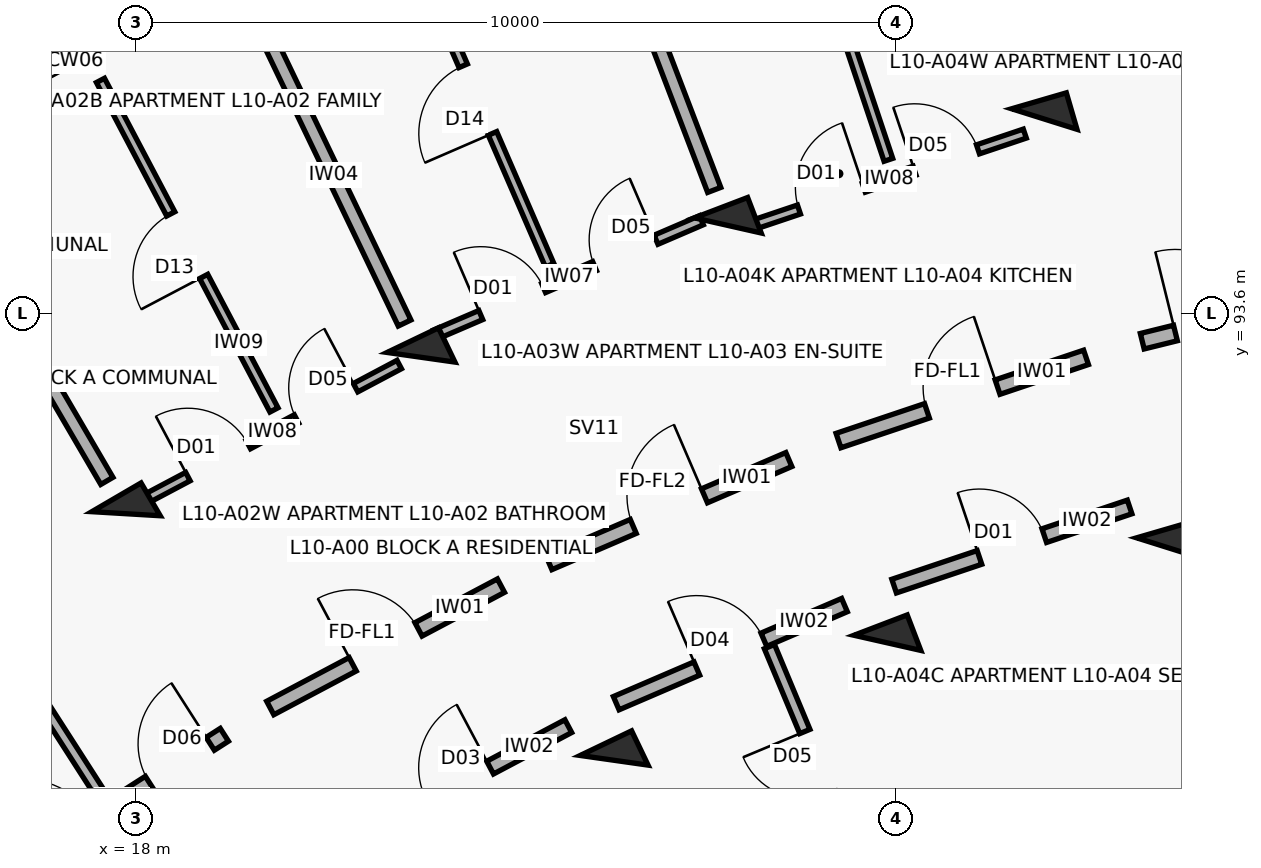
"""IFC4 building model, lengths in metres.
Left out: names, types, materials, properties, quantities, classifications, styles, units other than length and angle.
Written with IfcOpenShell. Run it as: python <this file> out.ifc"""

import sys

from ifc_helpers import new_model, si_unit, direction, frame, frame_2d, origin, origin_2d, place, context, subcontext, project, spatial, rectangle, extrude, element, fill, save


model = new_model("IFC4")
c1 = context("Model", 3, precision=1e-05, world=origin(), true_north=direction((0.0, 1.0)))
c2 = subcontext(c1, "Body", "Model", "MODEL_VIEW")
j1 = project(units=[si_unit("LENGTHUNIT", "METRE"), si_unit("PLANEANGLEUNIT", "RADIAN")], contexts=[c1])
p1 = place(None, origin())
s1 = spatial("IfcSite", under=j1, at=p1, CompositionType="ELEMENT")
p2 = place(p1, origin())
s2 = spatial("IfcBuilding", under=s1, at=p2, CompositionType="ELEMENT")
p3 = place(p2, frame((0.0, 0.0, 32.9)))
s3 = spatial("IfcBuildingStorey", under=s2, at=p3, CompositionType="ELEMENT", Elevation=32.9)
for number, where, z_axis, x_axis in (
    (1, (17.873, 90.96, 0.0), (0.0, 0.0, 1.0), (-0.504, 0.864, 0.0)),
    (2, (24.294, 87.716, 0.0), (0.0, 0.0, 1.0), (-0.432, 0.902, 0.0)),
    (3, (21.754, 93.019, 0.0), (0.0, 0.0, 1.0), (-0.432, 0.902, 0.0)),
    (4, (27.889, 89.261, 0.0), (0.0, 0.0, 1.0), (-0.357, 0.934, 0.0)),
    (5, (25.79, 94.753, 0.0), (0.0, 0.0, 1.0), (-0.357, 0.934, 0.0)),
    (6, (31.599, 90.508, 0.0), (0.0, 0.0, 1.0), (-0.28, 0.96, 0.0)),
    (7, (29.954, 96.153, 0.0), (0.0, 0.0, 1.0), (-0.28, 0.96, 0.0)),
):
    element("IfcColumn", number, at=place(p3, frame(where, z_axis=z_axis, x_axis=x_axis)), inside=s3, PredefinedType="COLUMN", context=c2, shape_type="SweptSolid", body=[
        extrude(rectangle(XDim=0.5, YDim=0.75, at=origin_2d()), origin(), (0.0, 0.0, 1.0), 3.1),
    ])
p4 = place(p3, frame((16.272, 86.199, 0.0), z_axis=(0.0, 0.0, 1.0), x_axis=(0.842257205985, 0.539075874963, 0.0)))
e8 = element("IfcWall", 8, at=p4, inside=s3, PredefinedType="SOLIDWALL", context=c2, shape_type="SweptSolid", body=[
    extrude(rectangle(XDim=3.436, YDim=0.2, at=frame_2d((1.718, 0.0))), origin(), (0.0, 0.0, 1.0), 2.08),
])
p5 = place(p4, frame((0.28, 0.0, 0.0)))
e9 = element("IfcOpeningElement", 9, at=p5, cuts=e8, PredefinedType="OPENING", context=c2, shape_type="SweptSolid", body=[
    extrude(rectangle(XDim=1.12, YDim=2.15, at=frame_2d((0.56, 1.075))), frame((0.0, 0.11, 0.0), z_axis=(0.0, -1.0, 0.0), x_axis=(1.0, 0.0, 0.0)), (0.0, 0.0, 1.0), 0.22),
])
p6 = place(p4, frame((2.266, 0.0, 0.0)))
e10 = element("IfcOpeningElement", 10, at=p6, cuts=e8, PredefinedType="OPENING", context=c2, shape_type="SweptSolid", body=[
    extrude(rectangle(XDim=0.95, YDim=2.1, at=frame_2d((0.475, 1.05))), frame((0.0, 0.11, 0.0), z_axis=(0.0, -1.0, 0.0), x_axis=(1.0, 0.0, 0.0)), (0.0, 0.0, 1.0), 0.22),
])
p7 = place(p3, frame((17.524, 87.288, 0.0), z_axis=(0.0, 0.0, 1.0), x_axis=(-0.540338452216, 0.841447774408, 0.0)))
e11 = element("IfcWall", 11, at=p7, inside=s3, PredefinedType="PARTITIONING", context=c2, shape_type="SweptSolid", body=[
    extrude(rectangle(XDim=7.95, YDim=0.14, at=frame_2d((3.975, 0.0))), origin(), (0.0, 0.0, 1.0), 2.08),
])
p8 = place(p7, frame((6.05, 0.0, 0.0)))
e12 = element("IfcOpeningElement", 12, at=p8, cuts=e11, PredefinedType="OPENING", context=c2, shape_type="SweptSolid", body=[
    extrude(rectangle(XDim=0.92, YDim=2.1, at=frame_2d((0.46, 1.05))), frame((0.0, 0.08, 0.0), z_axis=(0.0, -1.0, 0.0), x_axis=(1.0, 0.0, 0.0)), (0.0, 0.0, 1.0), 0.16),
])
p9 = place(p3, frame((19.77, 88.404, 0.0), z_axis=(0.0, 0.0, 1.0), x_axis=(0.883410853063, 0.468599258099, 0.0)))
e13 = element("IfcWall", 13, at=p9, inside=s3, PredefinedType="SOLIDWALL", context=c2, shape_type="SweptSolid", body=[
    extrude(rectangle(XDim=3.436, YDim=0.2, at=frame_2d((1.718, 0.0))), origin(), (0.0, 0.0, 1.0), 2.08),
])
p10 = place(p9, frame((1.228, 0.0, 0.0)))
e14 = element("IfcOpeningElement", 14, at=p10, cuts=e13, PredefinedType="OPENING", context=c2, shape_type="SweptSolid", body=[
    extrude(rectangle(XDim=0.98, YDim=2.15, at=frame_2d((0.49, 1.075))), frame((0.0, 0.11, 0.0), z_axis=(0.0, -1.0, 0.0), x_axis=(1.0, 0.0, 0.0)), (0.0, 0.0, 1.0), 0.22),
])
p11 = place(p3, frame((20.804, 86.634, 0.0), z_axis=(0.0, 0.0, 1.0), x_axis=(0.883444301944, 0.468536194293, 0.0)))
e15 = element("IfcWall", 15, at=p11, inside=s3, PredefinedType="SOLIDWALL", context=c2, shape_type="SweptSolid", body=[
    extrude(rectangle(XDim=3.269, YDim=0.19, at=frame_2d((1.634, 0.0))), origin(), (0.0, 0.0, 1.0), 2.08),
])
p12 = place(p11, frame((1.164, 0.0, 0.0)))
e16 = element("IfcOpeningElement", 16, at=p12, cuts=e15, PredefinedType="OPENING", context=c2, shape_type="SweptSolid", body=[
    extrude(rectangle(XDim=0.94, YDim=2.1, at=frame_2d((0.47, 1.05))), frame((0.0, 0.105, 0.0), z_axis=(0.0, -1.0, 0.0), x_axis=(1.0, 0.0, 0.0)), (0.0, 0.0, 1.0), 0.21),
])
p13 = place(p3, frame((18.113, 91.144, 0.0), z_axis=(0.0, 0.0, 1.0), x_axis=(0.88341855112, 0.46858474531, 0.0)))
e17 = element("IfcWall", 17, at=p13, inside=s3, PredefinedType="PARTITIONING", context=c2, shape_type="SweptSolid", body=[
    extrude(rectangle(XDim=3.797, YDim=0.125, at=frame_2d((1.898, 0.0))), origin(), (0.0, 0.0, 1.0), 2.08),
])
p14 = place(p13, frame((0.65, 0.0, 0.0)))
e18 = element("IfcOpeningElement", 18, at=p14, cuts=e17, PredefinedType="OPENING", context=c2, shape_type="SweptSolid", body=[
    extrude(rectangle(XDim=0.9, YDim=2.1, at=frame_2d((0.45, 1.05))), frame((0.0, 0.073, 0.0), z_axis=(0.0, -1.0, 0.0), x_axis=(1.0, 0.0, 0.0)), (0.0, 0.0, 1.0), 0.145),
])
p15 = place(p13, frame((2.267, 0.0, 0.0)))
e19 = element("IfcOpeningElement", 19, at=p15, cuts=e17, PredefinedType="OPENING", context=c2, shape_type="SweptSolid", body=[
    extrude(rectangle(XDim=0.88, YDim=2.1, at=frame_2d((0.44, 1.05))), frame((0.0, 0.073, 0.0), z_axis=(0.0, -1.0, 0.0), x_axis=(1.0, 0.0, 0.0)), (0.0, 0.0, 1.0), 0.145),
])
p16 = place(p3, frame((19.819, 92.326, 0.0), z_axis=(0.0, 0.0, 1.0), x_axis=(-0.465849102717, 0.884864177995, 0.0)))
e20 = element("IfcWall", 20, at=p16, inside=s3, PredefinedType="PARTITIONING", context=c2, shape_type="SweptSolid", body=[
    extrude(rectangle(XDim=4.9, YDim=0.12, at=frame_2d((2.45, 0.0))), origin(), (0.0, 0.0, 1.0), 2.08),
])
p17 = place(p16, frame((1.985, 0.0, 0.0)))
e21 = element("IfcOpeningElement", 21, at=p17, cuts=e20, PredefinedType="OPENING", context=c2, shape_type="SweptSolid", body=[
    extrude(rectangle(XDim=0.93, YDim=2.1, at=frame_2d((0.465, 1.05))), frame((0.0, 0.07, 0.0), z_axis=(0.0, -1.0, 0.0), x_axis=(1.0, 0.0, 0.0)), (0.0, 0.0, 1.0), 0.14),
])
p18 = place(p3, frame((17.621, 91.392, 0.0), z_axis=(0.0, 0.0, 1.0), x_axis=(-0.504216452091, 0.863577309475, 0.0)))
e22 = element("IfcWall", 22, at=p18, inside=s3, PredefinedType="SOLIDWALL", context=c2, shape_type="SweptSolid", body=[
    extrude(rectangle(XDim=4.35, YDim=0.185, at=frame_2d((2.175, 0.0))), origin(), (0.0, 0.0, 1.0), 2.08),
])
p19 = place(p3, frame((23.437, 90.316, 0.0), z_axis=(0.0, 0.0, 1.0), x_axis=(0.918718172399, 0.394913813008, 0.0)))
e23 = element("IfcWall", 23, at=p19, inside=s3, PredefinedType="SOLIDWALL", context=c2, shape_type="SweptSolid", body=[
    extrude(rectangle(XDim=3.436, YDim=0.2, at=frame_2d((1.718, 0.0))), origin(), (0.0, 0.0, 1.0), 2.08),
])
p20 = place(p19, frame((1.208, 0.0, 0.0)))
e24 = element("IfcOpeningElement", 24, at=p20, cuts=e23, PredefinedType="OPENING", context=c2, shape_type="SweptSolid", body=[
    extrude(rectangle(XDim=1.02, YDim=2.15, at=frame_2d((0.51, 1.075))), frame((0.0, 0.11, 0.0), z_axis=(0.0, -1.0, 0.0), x_axis=(1.0, 0.0, 0.0)), (0.0, 0.0, 1.0), 0.22),
])
p21 = place(p3, frame((24.322, 88.467, 0.0), z_axis=(0.0, 0.0, 1.0), x_axis=(0.918723391052, 0.394901672235, 0.0)))
e25 = element("IfcWall", 25, at=p21, inside=s3, PredefinedType="SOLIDWALL", context=c2, shape_type="SweptSolid", body=[
    extrude(rectangle(XDim=3.269, YDim=0.19, at=frame_2d((1.634, 0.0))), origin(), (0.0, 0.0, 1.0), 2.08),
])
p22 = place(p21, frame((1.154, 0.0, 0.0)))
e26 = element("IfcOpeningElement", 26, at=p22, cuts=e25, PredefinedType="OPENING", context=c2, shape_type="SweptSolid", body=[
    extrude(rectangle(XDim=0.96, YDim=2.1, at=frame_2d((0.48, 1.05))), frame((0.0, 0.105, 0.0), z_axis=(0.0, -1.0, 0.0), x_axis=(1.0, 0.0, 0.0)), (0.0, 0.0, 1.0), 0.21),
])
p23 = place(p3, frame((27.609, 86.166, 0.0), z_axis=(0.0, 0.0, 1.0), x_axis=(-0.385151143297, 0.922853507777, 0.0)))
e27 = element("IfcWall", 27, at=p23, inside=s3, PredefinedType="PARTITIONING", context=c2, shape_type="SweptSolid", body=[
    extrude(rectangle(XDim=3.3, YDim=0.145, at=frame_2d((1.65, 0.0))), origin(), (0.0, 0.0, 1.0), 2.08),
])
p24 = place(p23, frame((1.21, 0.0, 0.0)))
e28 = element("IfcOpeningElement", 28, at=p24, cuts=e27, PredefinedType="OPENING", context=c2, shape_type="SweptSolid", body=[
    extrude(rectangle(XDim=0.88, YDim=2.1, at=frame_2d((0.44, 1.05))), frame((0.0, 0.083, 0.0), z_axis=(0.0, -1.0, 0.0), x_axis=(1.0, 0.0, 0.0)), (0.0, 0.0, 1.0), 0.165),
])
p25 = place(p3, frame((21.943, 93.317, 0.0), z_axis=(0.0, 0.0, 1.0), x_axis=(0.918726854017, 0.394893615684, 0.0)))
e29 = element("IfcWall", 29, at=p25, inside=s3, PredefinedType="PARTITIONING", context=c2, shape_type="SweptSolid", body=[
    extrude(rectangle(XDim=3.81, YDim=0.13, at=frame_2d((1.905, 0.0))), origin(), (0.0, 0.0, 1.0), 2.08),
])
p26 = place(p25, frame((0.65, 0.0, 0.0)))
e30 = element("IfcOpeningElement", 30, at=p26, cuts=e29, PredefinedType="OPENING", context=c2, shape_type="SweptSolid", body=[
    extrude(rectangle(XDim=0.9, YDim=2.1, at=frame_2d((0.45, 1.05))), frame((0.0, 0.075, 0.0), z_axis=(0.0, -1.0, 0.0), x_axis=(1.0, 0.0, 0.0)), (0.0, 0.0, 1.0), 0.15),
])
p27 = place(p25, frame((2.28, 0.0, 0.0)))
e31 = element("IfcOpeningElement", 31, at=p27, cuts=e29, PredefinedType="OPENING", context=c2, shape_type="SweptSolid", body=[
    extrude(rectangle(XDim=0.88, YDim=2.1, at=frame_2d((0.44, 1.05))), frame((0.0, 0.075, 0.0), z_axis=(0.0, -1.0, 0.0), x_axis=(1.0, 0.0, 0.0)), (0.0, 0.0, 1.0), 0.15),
])
p28 = place(p3, frame((23.446, 94.23, 0.0), z_axis=(0.0, 0.0, 1.0), x_axis=(-0.3976752315, 0.917526244993, 0.0)))
e32 = element("IfcWall", 32, at=p28, inside=s3, PredefinedType="PARTITIONING", context=c2, shape_type="SweptSolid", body=[
    extrude(rectangle(XDim=4.75, YDim=0.12, at=frame_2d((2.375, 0.0))), origin(), (0.0, 0.0, 1.0), 2.08),
])
p29 = place(p28, frame((1.89, 0.0, 0.0)))
e33 = element("IfcOpeningElement", 33, at=p29, cuts=e32, PredefinedType="OPENING", context=c2, shape_type="SweptSolid", body=[
    extrude(rectangle(XDim=0.97, YDim=2.1, at=frame_2d((0.485, 1.05))), frame((0.0, 0.07, 0.0), z_axis=(0.0, -1.0, 0.0), x_axis=(1.0, 0.0, 0.0)), (0.0, 0.0, 1.0), 0.14),
])
p30 = place(p3, frame((21.538, 93.469, 0.0), z_axis=(0.0, 0.0, 1.0), x_axis=(-0.432086898897, 0.901831975371, 0.0)))
e34 = element("IfcWall", 34, at=p30, inside=s3, PredefinedType="SOLIDWALL", context=c2, shape_type="SweptSolid", body=[
    extrude(rectangle(XDim=4.35, YDim=0.185, at=frame_2d((2.175, 0.0))), origin(), (0.0, 0.0, 1.0), 2.08),
])
p31 = place(p3, frame((27.247, 91.923, 0.0), z_axis=(0.0, 0.0, 1.0), x_axis=(0.947863007629, 0.318678080151, 0.0)))
e35 = element("IfcWall", 35, at=p31, inside=s3, PredefinedType="SOLIDWALL", context=c2, shape_type="SweptSolid", body=[
    extrude(rectangle(XDim=3.436, YDim=0.2, at=frame_2d((1.718, 0.0))), origin(), (0.0, 0.0, 1.0), 2.08),
])
p32 = place(p31, frame((1.228, 0.0, 0.0)))
e36 = element("IfcOpeningElement", 36, at=p32, cuts=e35, PredefinedType="OPENING", context=c2, shape_type="SweptSolid", body=[
    extrude(rectangle(XDim=0.98, YDim=2.15, at=frame_2d((0.49, 1.075))), frame((0.0, 0.11, 0.0), z_axis=(0.0, -1.0, 0.0), x_axis=(1.0, 0.0, 0.0)), (0.0, 0.0, 1.0), 0.22),
])
p33 = place(p3, frame((27.979, 90.008, 0.0), z_axis=(0.0, 0.0, 1.0), x_axis=(0.94787351033, 0.318646839643, 0.0)))
e37 = element("IfcWall", 37, at=p33, inside=s3, PredefinedType="SOLIDWALL", context=c2, shape_type="SweptSolid", body=[
    extrude(rectangle(XDim=3.269, YDim=0.19, at=frame_2d((1.634, 0.0))), origin(), (0.0, 0.0, 1.0), 2.08),
])
p34 = place(p33, frame((1.184, 0.0, 0.0)))
e38 = element("IfcOpeningElement", 38, at=p34, cuts=e37, PredefinedType="OPENING", context=c2, shape_type="SweptSolid", body=[
    extrude(rectangle(XDim=0.9, YDim=2.1, at=frame_2d((0.45, 1.05))), frame((0.0, 0.105, 0.0), z_axis=(0.0, -1.0, 0.0), x_axis=(1.0, 0.0, 0.0)), (0.0, 0.0, 1.0), 0.21),
])
p35 = place(p3, frame((26.11, 94.756, 0.0), z_axis=(0.0, 0.0, 1.0), x_axis=(0.947873924847, 0.318645606584, 0.0)))
e39 = element("IfcWall", 39, at=p35, inside=s3, PredefinedType="PARTITIONING", context=c2, shape_type="SweptSolid", body=[
    extrude(rectangle(XDim=3.785, YDim=0.125, at=frame_2d((1.893, 0.0))), origin(), (0.0, 0.0, 1.0), 2.08),
])
p36 = place(p35, frame((0.65, 0.0, 0.0)))
e40 = element("IfcOpeningElement", 40, at=p36, cuts=e39, PredefinedType="OPENING", context=c2, shape_type="SweptSolid", body=[
    extrude(rectangle(XDim=0.9, YDim=2.1, at=frame_2d((0.45, 1.05))), frame((0.0, 0.073, 0.0), z_axis=(0.0, -1.0, 0.0), x_axis=(1.0, 0.0, 0.0)), (0.0, 0.0, 1.0), 0.145),
])
p37 = place(p35, frame((2.255, 0.0, 0.0)))
e41 = element("IfcOpeningElement", 41, at=p37, cuts=e39, PredefinedType="OPENING", context=c2, shape_type="SweptSolid", body=[
    extrude(rectangle(XDim=0.88, YDim=2.1, at=frame_2d((0.44, 1.05))), frame((0.0, 0.073, 0.0), z_axis=(0.0, -1.0, 0.0), x_axis=(1.0, 0.0, 0.0)), (0.0, 0.0, 1.0), 0.145),
])
p38 = place(p3, frame((27.903, 95.616, 0.0), z_axis=(0.0, 0.0, 1.0), x_axis=(-0.31722829501, 0.948349201953, 0.0)))
e42 = element("IfcWall", 42, at=p38, inside=s3, PredefinedType="PARTITIONING", context=c2, shape_type="SweptSolid", body=[
    extrude(rectangle(XDim=5.05, YDim=0.12, at=frame_2d((2.525, 0.0))), origin(), (0.0, 0.0, 1.0), 2.08),
])
p39 = place(p38, frame((2.02, 0.0, 0.0)))
e43 = element("IfcOpeningElement", 43, at=p39, cuts=e42, PredefinedType="OPENING", context=c2, shape_type="SweptSolid", body=[
    extrude(rectangle(XDim=1.01, YDim=2.1, at=frame_2d((0.505, 1.05))), frame((0.0, 0.07, 0.0), z_axis=(0.0, -1.0, 0.0), x_axis=(1.0, 0.0, 0.0)), (0.0, 0.0, 1.0), 0.14),
])
p40 = place(p3, frame((25.611, 95.22, 0.0), z_axis=(0.0, 0.0, 1.0), x_axis=(-0.357064016205, 0.934079915388, 0.0)))
e44 = element("IfcWall", 44, at=p40, inside=s3, PredefinedType="SOLIDWALL", context=c2, shape_type="SweptSolid", body=[
    extrude(rectangle(XDim=4.35, YDim=0.185, at=frame_2d((2.175, 0.0))), origin(), (0.0, 0.0, 1.0), 2.08),
])
p41 = place(p3, frame((31.243, 93.23, 0.0), z_axis=(0.0, 0.0, 1.0), x_axis=(0.970719238682, 0.240216901263, 0.0)))
e45 = element("IfcWall", 45, at=p41, inside=s3, PredefinedType="SOLIDWALL", context=c2, shape_type="SweptSolid", body=[
    extrude(rectangle(XDim=3.296, YDim=0.21, at=frame_2d((1.648, 0.0))), origin(), (0.0, 0.0, 1.0), 2.08),
])
p42 = place(p41, frame((0.45, 0.0, 0.0)))
e46 = element("IfcOpeningElement", 46, at=p42, cuts=e45, PredefinedType="OPENING", context=c2, shape_type="SweptSolid", body=[
    extrude(rectangle(XDim=1.1, YDim=2.15, at=frame_2d((0.55, 1.075))), frame((0.0, 0.115, 0.0), z_axis=(0.0, -1.0, 0.0), x_axis=(1.0, 0.0, 0.0)), (0.0, 0.0, 1.0), 0.23),
])
p43 = place(p41, frame((1.726, 0.0, 0.0)))
e47 = element("IfcOpeningElement", 47, at=p43, cuts=e45, PredefinedType="OPENING", context=c2, shape_type="SweptSolid", body=[
    extrude(rectangle(XDim=1.12, YDim=2.15, at=frame_2d((0.56, 1.075))), frame((0.0, 0.115, 0.0), z_axis=(0.0, -1.0, 0.0), x_axis=(1.0, 0.0, 0.0)), (0.0, 0.0, 1.0), 0.23),
])
p44 = place(p6, origin())
e48 = element("IfcDoor", 48, at=p44, inside=s3, OperationType="SINGLE_SWING_RIGHT", PredefinedType="DOOR", context=c2, shape_type="SweptSolid", body=[
    extrude(rectangle(XDim=0.95, YDim=2.1, at=frame_2d((0.475, 1.05))), frame((0.0, 0.025, 0.0), z_axis=(0.0, -1.0, 0.0), x_axis=(1.0, 0.0, 0.0)), (0.0, 0.0, 1.0), 0.05),
])
fill(e10, e48)
p45 = place(p10, origin())
e49 = element("IfcDoor", 49, at=p45, inside=s3, OperationType="SINGLE_SWING_LEFT", PredefinedType="DOOR", context=c2, shape_type="SweptSolid", body=[
    extrude(rectangle(XDim=0.98, YDim=2.15, at=frame_2d((0.49, 1.075))), frame((0.0, 0.025, 0.0), z_axis=(0.0, -1.0, 0.0), x_axis=(1.0, 0.0, 0.0)), (0.0, 0.0, 1.0), 0.05),
])
fill(e14, e49)
p46 = place(p12, origin())
e50 = element("IfcDoor", 50, at=p46, inside=s3, OperationType="SINGLE_SWING_RIGHT", PredefinedType="DOOR", context=c2, shape_type="SweptSolid", body=[
    extrude(rectangle(XDim=0.94, YDim=2.1, at=frame_2d((0.47, 1.05))), frame((0.0, 0.025, 0.0), z_axis=(0.0, -1.0, 0.0), x_axis=(1.0, 0.0, 0.0)), (0.0, 0.0, 1.0), 0.05),
])
fill(e16, e50)
p47 = place(p14, origin())
e51 = element("IfcDoor", 51, at=p47, inside=s3, OperationType="SINGLE_SWING_LEFT", PredefinedType="DOOR", context=c2, shape_type="SweptSolid", body=[
    extrude(rectangle(XDim=0.9, YDim=2.1, at=frame_2d((0.45, 1.05))), frame((0.0, 0.025, 0.0), z_axis=(0.0, -1.0, 0.0), x_axis=(1.0, 0.0, 0.0)), (0.0, 0.0, 1.0), 0.05),
])
fill(e18, e51)
p48 = place(p15, origin())
e52 = element("IfcDoor", 52, at=p48, inside=s3, OperationType="SINGLE_SWING_RIGHT", PredefinedType="DOOR", context=c2, shape_type="SweptSolid", body=[
    extrude(rectangle(XDim=0.88, YDim=2.1, at=frame_2d((0.44, 1.05))), frame((0.0, 0.025, 0.0), z_axis=(0.0, -1.0, 0.0), x_axis=(1.0, 0.0, 0.0)), (0.0, 0.0, 1.0), 0.05),
])
fill(e19, e52)
p49 = place(p17, origin())
e53 = element("IfcDoor", 53, at=p49, inside=s3, OperationType="SINGLE_SWING_LEFT", PredefinedType="DOOR", context=c2, shape_type="SweptSolid", body=[
    extrude(rectangle(XDim=0.93, YDim=2.1, at=frame_2d((0.465, 1.05))), frame((0.0, 0.025, 0.0), z_axis=(0.0, -1.0, 0.0), x_axis=(1.0, 0.0, 0.0)), (0.0, 0.0, 1.0), 0.05),
])
fill(e21, e53)
p50 = place(p20, origin())
e54 = element("IfcDoor", 54, at=p50, inside=s3, OperationType="SINGLE_SWING_RIGHT", PredefinedType="DOOR", context=c2, shape_type="SweptSolid", body=[
    extrude(rectangle(XDim=1.02, YDim=2.15, at=frame_2d((0.51, 1.075))), frame((0.0, 0.025, 0.0), z_axis=(0.0, -1.0, 0.0), x_axis=(1.0, 0.0, 0.0)), (0.0, 0.0, 1.0), 0.05),
])
fill(e24, e54)
p51 = place(p22, origin())
e55 = element("IfcDoor", 55, at=p51, inside=s3, OperationType="SINGLE_SWING_LEFT", PredefinedType="DOOR", context=c2, shape_type="SweptSolid", body=[
    extrude(rectangle(XDim=0.96, YDim=2.1, at=frame_2d((0.48, 1.05))), frame((0.0, 0.025, 0.0), z_axis=(0.0, -1.0, 0.0), x_axis=(1.0, 0.0, 0.0)), (0.0, 0.0, 1.0), 0.05),
])
fill(e26, e55)
p52 = place(p24, origin())
e56 = element("IfcDoor", 56, at=p52, inside=s3, OperationType="SINGLE_SWING_RIGHT", PredefinedType="DOOR", context=c2, shape_type="SweptSolid", body=[
    extrude(rectangle(XDim=0.88, YDim=2.1, at=frame_2d((0.44, 1.05))), frame((0.0, 0.025, 0.0), z_axis=(0.0, -1.0, 0.0), x_axis=(1.0, 0.0, 0.0)), (0.0, 0.0, 1.0), 0.05),
])
fill(e28, e56)
p53 = place(p26, origin())
e57 = element("IfcDoor", 57, at=p53, inside=s3, OperationType="SINGLE_SWING_LEFT", PredefinedType="DOOR", context=c2, shape_type="SweptSolid", body=[
    extrude(rectangle(XDim=0.9, YDim=2.1, at=frame_2d((0.45, 1.05))), frame((0.0, 0.025, 0.0), z_axis=(0.0, -1.0, 0.0), x_axis=(1.0, 0.0, 0.0)), (0.0, 0.0, 1.0), 0.05),
])
fill(e30, e57)
p54 = place(p27, origin())
e58 = element("IfcDoor", 58, at=p54, inside=s3, OperationType="SINGLE_SWING_RIGHT", PredefinedType="DOOR", context=c2, shape_type="SweptSolid", body=[
    extrude(rectangle(XDim=0.88, YDim=2.1, at=frame_2d((0.44, 1.05))), frame((0.0, 0.025, 0.0), z_axis=(0.0, -1.0, 0.0), x_axis=(1.0, 0.0, 0.0)), (0.0, 0.0, 1.0), 0.05),
])
fill(e31, e58)
p55 = place(p29, origin())
e59 = element("IfcDoor", 59, at=p55, inside=s3, OperationType="SINGLE_SWING_LEFT", PredefinedType="DOOR", context=c2, shape_type="SweptSolid", body=[
    extrude(rectangle(XDim=0.97, YDim=2.1, at=frame_2d((0.485, 1.05))), frame((0.0, 0.025, 0.0), z_axis=(0.0, -1.0, 0.0), x_axis=(1.0, 0.0, 0.0)), (0.0, 0.0, 1.0), 0.05),
])
fill(e33, e59)
p56 = place(p32, origin())
e60 = element("IfcDoor", 60, at=p56, inside=s3, OperationType="SINGLE_SWING_RIGHT", PredefinedType="DOOR", context=c2, shape_type="SweptSolid", body=[
    extrude(rectangle(XDim=0.98, YDim=2.15, at=frame_2d((0.49, 1.075))), frame((0.0, 0.025, 0.0), z_axis=(0.0, -1.0, 0.0), x_axis=(1.0, 0.0, 0.0)), (0.0, 0.0, 1.0), 0.05),
])
fill(e36, e60)
p57 = place(p34, origin())
e61 = element("IfcDoor", 61, at=p57, inside=s3, OperationType="SINGLE_SWING_LEFT", PredefinedType="DOOR", context=c2, shape_type="SweptSolid", body=[
    extrude(rectangle(XDim=0.9, YDim=2.1, at=frame_2d((0.45, 1.05))), frame((0.0, 0.025, 0.0), z_axis=(0.0, -1.0, 0.0), x_axis=(1.0, 0.0, 0.0)), (0.0, 0.0, 1.0), 0.05),
])
fill(e38, e61)
p58 = place(p36, origin())
e62 = element("IfcDoor", 62, at=p58, inside=s3, OperationType="SINGLE_SWING_RIGHT", PredefinedType="DOOR", context=c2, shape_type="SweptSolid", body=[
    extrude(rectangle(XDim=0.9, YDim=2.1, at=frame_2d((0.45, 1.05))), frame((0.0, 0.025, 0.0), z_axis=(0.0, -1.0, 0.0), x_axis=(1.0, 0.0, 0.0)), (0.0, 0.0, 1.0), 0.05),
])
fill(e40, e62)
p59 = place(p37, origin())
e63 = element("IfcDoor", 63, at=p59, inside=s3, OperationType="SINGLE_SWING_LEFT", PredefinedType="DOOR", context=c2, shape_type="SweptSolid", body=[
    extrude(rectangle(XDim=0.88, YDim=2.1, at=frame_2d((0.44, 1.05))), frame((0.0, 0.025, 0.0), z_axis=(0.0, -1.0, 0.0), x_axis=(1.0, 0.0, 0.0)), (0.0, 0.0, 1.0), 0.05),
])
fill(e41, e63)
p60 = place(p42, origin())
e64 = element("IfcDoor", 64, at=p60, inside=s3, OperationType="SINGLE_SWING_LEFT", PredefinedType="DOOR", context=c2, shape_type="SweptSolid", body=[
    extrude(rectangle(XDim=1.1, YDim=2.15, at=frame_2d((0.55, 1.075))), frame((0.0, 0.025, 0.0), z_axis=(0.0, -1.0, 0.0), x_axis=(1.0, 0.0, 0.0)), (0.0, 0.0, 1.0), 0.05),
])
fill(e46, e64)
save(model, sys.argv[1])
